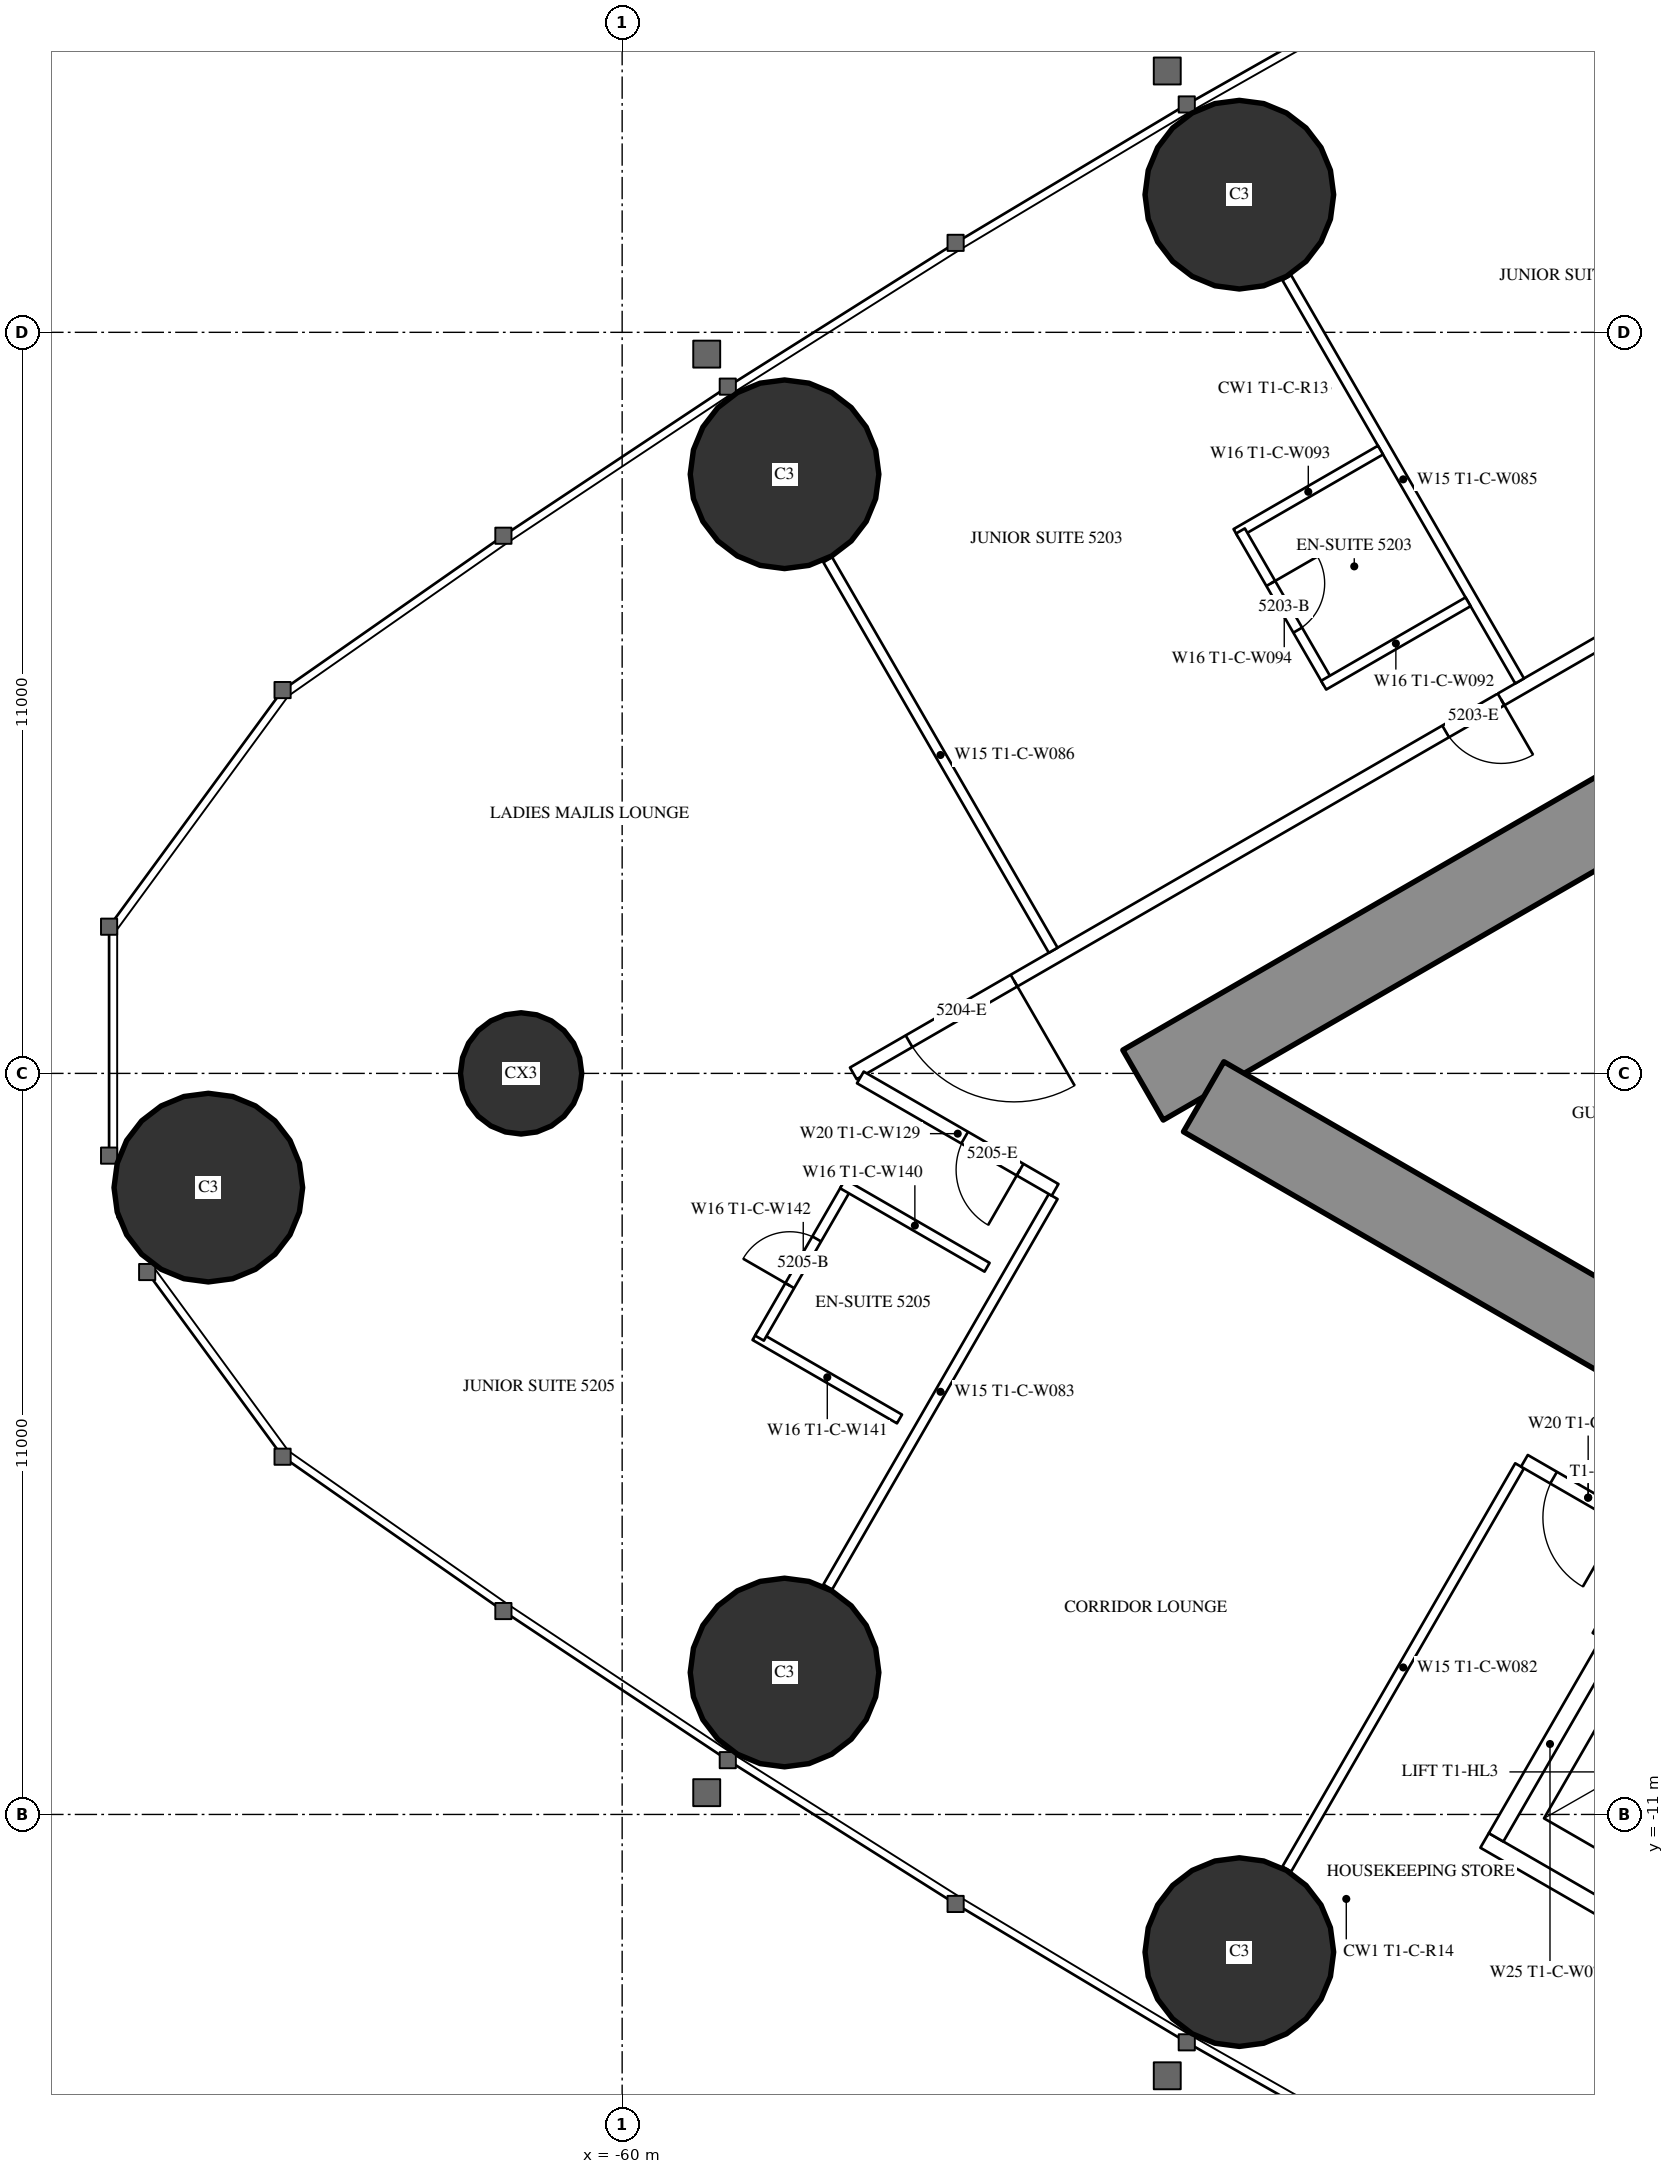
"""IFC4 building model, lengths in metres.
Left out: names, types, materials, properties, quantities, classifications, styles, units other than length and angle.
Written with IfcOpenShell. Run it as: python <this file> out.ifc"""

import sys

from ifc_helpers import new_model, si_unit, direction, frame, frame_2d, origin, origin_2d, place, context, subcontext, project, spatial, rectangle, circle, extrude, element, fill, save


model = new_model("IFC4")
c1 = context("Model", 3, precision=1e-05, world=origin(), true_north=direction((0.0, 1.0)))
c2 = subcontext(c1, "Body", "Model", "MODEL_VIEW")
j1 = project(units=[si_unit("LENGTHUNIT", "METRE"), si_unit("PLANEANGLEUNIT", "RADIAN")], contexts=[c1])
p1 = place(None, origin())
s1 = spatial("IfcSite", under=j1, at=p1, CompositionType="ELEMENT")
p2 = place(p1, origin())
s2 = spatial("IfcBuilding", under=s1, at=p2, CompositionType="ELEMENT")
p3 = place(p2, frame((0.0, 0.0, 194.8)))
s3 = spatial("IfcBuildingStorey", under=s2, at=p3, CompositionType="ELEMENT", Elevation=194.8)
for number, where, z_axis, x_axis in (
    (1, (-66.143, -1.695, 0.0), (0.0, 0.0, 1.0), (1.0, 0.0, 0.0)),
    (2, (-57.59, -8.893, 0.0), (0.0, 0.0, 1.0), (1.0, 0.0, 0.0)),
    (3, (-50.839, -13.043, 0.0), (0.0, 0.0, 1.0), (1.0, 0.0, 0.0)),
    (4, (-50.839, 13.043, 0.0), (0.0, 0.0, 1.0), (1.0, 0.0, 0.0)),
    (5, (-57.59, 8.893, 0.0), (0.0, 0.0, 1.0), (1.0, 0.0, 0.0)),
):
    element("IfcColumn", number, at=place(p3, frame(where, z_axis=z_axis, x_axis=x_axis)), inside=s3, PredefinedType="COLUMN", context=c2, shape_type="SweptSolid", body=[
        extrude(circle(Radius=1.4, at=origin_2d()), origin(), (0.0, 0.0, 1.0), 3.5),
    ])
p4 = place(p3, frame((-61.5, 0.0, 0.0), z_axis=(0.0, 0.0, 1.0), x_axis=(1.0, 0.0, 0.0)))
e6 = element("IfcColumn", 6, at=p4, inside=s3, PredefinedType="COLUMN", context=c2, shape_type="SweptSolid", body=[
    extrude(circle(Radius=0.9, at=origin_2d()), origin(), (0.0, 0.0, 1.0), 3.5),
])
p5 = place(p3, frame((-27.2, 14.3, 0.0), z_axis=(0.0, 0.0, 1.0), x_axis=(-0.866026593062, -0.499997940104, 0.0)))
e7 = element("IfcWall", 7, at=p5, inside=s3, PredefinedType="SHEAR", context=c2, shape_type="SweptSolid", body=[
    extrude(rectangle(XDim=28.946, YDim=1.2, at=frame_2d((14.473, 0.0))), origin(), (0.0, 0.0, 1.0), 3.5),
])
p6 = place(p5, frame((4.6, 0.0, 0.0)))
e8 = element("IfcOpeningElement", 8, at=p6, cuts=e7, PredefinedType="OPENING", context=c2, shape_type="SweptSolid", body=[
    extrude(rectangle(XDim=1.0, YDim=2.2, at=frame_2d((0.5, 1.1))), frame((0.0, 0.61, 0.0), z_axis=(0.0, -1.0, 0.0), x_axis=(1.0, 0.0, 0.0)), (0.0, 0.0, 1.0), 1.22),
])
p7 = place(p5, frame((13.395, 0.0, 0.0)))
e9 = element("IfcOpeningElement", 9, at=p7, cuts=e7, PredefinedType="OPENING", context=c2, shape_type="SweptSolid", body=[
    extrude(rectangle(XDim=1.8, YDim=2.2, at=frame_2d((0.9, 1.1))), frame((0.0, 0.61, 0.0), z_axis=(0.0, -1.0, 0.0), x_axis=(1.0, 0.0, 0.0)), (0.0, 0.0, 1.0), 1.22),
])
p8 = place(p3, frame((-27.2, -14.3, 0.0), z_axis=(0.0, 0.0, 1.0), x_axis=(-0.866024021859, 0.500002393557, 0.0)))
e10 = element("IfcWall", 10, at=p8, inside=s3, PredefinedType="SHEAR", context=c2, shape_type="SweptSolid", body=[
    extrude(rectangle(XDim=27.907, YDim=1.2, at=frame_2d((13.954, 0.0))), origin(), (0.0, 0.0, 1.0), 3.5),
])
p9 = place(p8, frame((4.6, 0.0, 0.0)))
e11 = element("IfcOpeningElement", 11, at=p9, cuts=e10, PredefinedType="OPENING", context=c2, shape_type="SweptSolid", body=[
    extrude(rectangle(XDim=1.0, YDim=2.2, at=frame_2d((0.5, 1.1))), frame((0.0, 0.61, 0.0), z_axis=(0.0, -1.0, 0.0), x_axis=(1.0, 0.0, 0.0)), (0.0, 0.0, 1.0), 1.22),
])
p10 = place(p8, frame((13.395, 0.0, 0.0)))
e12 = element("IfcOpeningElement", 12, at=p10, cuts=e10, PredefinedType="OPENING", context=c2, shape_type="SweptSolid", body=[
    extrude(rectangle(XDim=1.8, YDim=2.2, at=frame_2d((0.9, 1.1))), frame((0.0, 0.61, 0.0), z_axis=(0.0, -1.0, 0.0), x_axis=(1.0, 0.0, 0.0)), (0.0, 0.0, 1.0), 1.22),
])
p11 = place(p3, frame((-27.86, 16.575, 0.0), z_axis=(0.0, 0.0, 1.0), x_axis=(-0.866025533911, -0.499999774615, 0.0)))
e13 = element("IfcWall", 13, at=p11, inside=s3, PredefinedType="PARTITIONING", context=c2, shape_type="SweptSolid", body=[
    extrude(rectangle(XDim=33.149, YDim=0.2, at=frame_2d((16.575, 0.0))), origin(), (0.0, 0.0, 1.0), 3.25),
])
p12 = place(p11, frame((3.75, 0.0, 0.0)))
e14 = element("IfcOpeningElement", 14, at=p12, cuts=e13, PredefinedType="OPENING", context=c2, shape_type="SweptSolid", body=[
    extrude(rectangle(XDim=1.0, YDim=2.2, at=frame_2d((0.5, 1.1))), frame((0.0, 0.11, 0.0), z_axis=(0.0, -1.0, 0.0), x_axis=(1.0, 0.0, 0.0)), (0.0, 0.0, 1.0), 0.22),
])
p13 = place(p11, frame((16.402, 0.0, 0.0)))
e15 = element("IfcOpeningElement", 15, at=p13, cuts=e13, PredefinedType="OPENING", context=c2, shape_type="SweptSolid", body=[
    extrude(rectangle(XDim=0.95, YDim=2.2, at=frame_2d((0.475, 1.1))), frame((0.0, 0.11, 0.0), z_axis=(0.0, -1.0, 0.0), x_axis=(1.0, 0.0, 0.0)), (0.0, 0.0, 1.0), 0.22),
])
p14 = place(p11, frame((22.047, 0.0, 0.0)))
e16 = element("IfcOpeningElement", 16, at=p14, cuts=e13, PredefinedType="OPENING", context=c2, shape_type="SweptSolid", body=[
    extrude(rectangle(XDim=0.95, YDim=2.2, at=frame_2d((0.475, 1.1))), frame((0.0, 0.11, 0.0), z_axis=(0.0, -1.0, 0.0), x_axis=(1.0, 0.0, 0.0)), (0.0, 0.0, 1.0), 0.22),
])
p15 = place(p11, frame((30.396, 0.0, 0.0)))
e17 = element("IfcOpeningElement", 17, at=p15, cuts=e13, PredefinedType="OPENING", context=c2, shape_type="SweptSolid", body=[
    extrude(rectangle(XDim=1.8, YDim=2.2, at=frame_2d((0.9, 1.1))), frame((0.0, 0.11, 0.0), z_axis=(0.0, -1.0, 0.0), x_axis=(1.0, 0.0, 0.0)), (0.0, 0.0, 1.0), 0.22),
])
p16 = place(p3, frame((-46.679, 5.825, 0.0), z_axis=(0.0, 0.0, 1.0), x_axis=(-0.500006839597, 0.866021454905, 0.0)))
e18 = element("IfcWall", 18, at=p16, inside=s3, PredefinedType="PARTITIONING", context=c2, shape_type="SweptSolid", body=[
    extrude(rectangle(XDim=6.911, YDim=0.15, at=frame_2d((3.456, 0.0))), origin(), (0.0, 0.0, 1.0), 2.3),
])
p17 = place(p3, frame((-53.602, 1.828, 0.0), z_axis=(0.0, 0.0, 1.0), x_axis=(-0.49999191814, 0.866030069798, 0.0)))
e19 = element("IfcWall", 19, at=p17, inside=s3, PredefinedType="PARTITIONING", context=c2, shape_type="SweptSolid", body=[
    extrude(rectangle(XDim=6.692, YDim=0.15, at=frame_2d((3.346, 0.0))), origin(), (0.0, 0.0, 1.0), 2.3),
])
p18 = place(p3, frame((-46.679, -5.825, 0.0), z_axis=(0.0, 0.0, 1.0), x_axis=(-0.500006839597, -0.866021454905, 0.0)))
e20 = element("IfcWall", 20, at=p18, inside=s3, PredefinedType="PARTITIONING", context=c2, shape_type="SweptSolid", body=[
    extrude(rectangle(XDim=6.911, YDim=0.15, at=frame_2d((3.456, 0.0))), origin(), (0.0, 0.0, 1.0), 2.3),
])
p19 = place(p3, frame((-53.602, -1.828, 0.0), z_axis=(0.0, 0.0, 1.0), x_axis=(-0.49999191814, -0.866030069798, 0.0)))
e21 = element("IfcWall", 21, at=p19, inside=s3, PredefinedType="PARTITIONING", context=c2, shape_type="SweptSolid", body=[
    extrude(rectangle(XDim=6.692, YDim=0.15, at=frame_2d((3.346, 0.0))), origin(), (0.0, 0.0, 1.0), 2.3),
])
p20 = place(p3, frame((-44.652, -6.764, 0.0), z_axis=(0.0, 0.0, 1.0), x_axis=(-0.485424724123, -0.874278466629, 0.0)))
e22 = element("IfcWall", 22, at=p20, inside=s3, PredefinedType="PARTITIONING", context=c2, shape_type="SweptSolid", body=[
    extrude(rectangle(XDim=1.805, YDim=0.15, at=frame_2d((0.903, 0.0))), origin(), (0.0, 0.0, 1.0), 3.25),
])
p21 = place(p3, frame((-44.715, -6.844, 0.0), z_axis=(0.0, 0.0, 1.0), x_axis=(-0.865999496279, 0.500044870432, 0.0)))
e23 = element("IfcWall", 23, at=p21, inside=s3, PredefinedType="PARTITIONING", context=c2, shape_type="SweptSolid", body=[
    extrude(rectangle(XDim=2.185, YDim=0.2, at=frame_2d((1.092, 0.0))), origin(), (0.0, 0.0, 1.0), 3.25),
])
p22 = place(p21, frame((0.5, 0.0, 0.0)))
e24 = element("IfcOpeningElement", 24, at=p22, cuts=e23, PredefinedType="OPENING", context=c2, shape_type="SweptSolid", body=[
    extrude(rectangle(XDim=1.185, YDim=2.2, at=frame_2d((0.593, 1.1))), frame((0.0, 0.11, 0.0), z_axis=(0.0, -1.0, 0.0), x_axis=(1.0, 0.0, 0.0)), (0.0, 0.0, 1.0), 0.22),
])
p23 = place(p3, frame((-53.574, -1.729, 0.0), z_axis=(0.0, 0.0, 1.0), x_axis=(-0.866019930389, 0.500009480079, 0.0)))
e25 = element("IfcWall", 25, at=p23, inside=s3, PredefinedType="PARTITIONING", context=c2, shape_type="SweptSolid", body=[
    extrude(rectangle(XDim=3.338, YDim=0.2, at=frame_2d((1.669, 0.0))), origin(), (0.0, 0.0, 1.0), 3.25),
])
p24 = place(p23, frame((0.6, 0.0, 0.0)))
e26 = element("IfcOpeningElement", 26, at=p24, cuts=e25, PredefinedType="OPENING", context=c2, shape_type="SweptSolid", body=[
    extrude(rectangle(XDim=0.95, YDim=2.2, at=frame_2d((0.475, 1.1))), frame((0.0, 0.11, 0.0), z_axis=(0.0, -1.0, 0.0), x_axis=(1.0, 0.0, 0.0)), (0.0, 0.0, 1.0), 0.22),
])
p25 = place(p3, frame((-48.744, 9.252, 0.0), z_axis=(0.0, 0.0, 1.0), x_axis=(-0.866006523861, -0.500032699561, 0.0)))
e27 = element("IfcWall", 27, at=p25, inside=s3, PredefinedType="PARTITIONING", context=c2, shape_type="SweptSolid", body=[
    extrude(rectangle(XDim=2.475, YDim=0.15, at=frame_2d((1.237, 0.0))), origin(), (0.0, 0.0, 1.0), 3.25),
])
p26 = place(p3, frame((-49.522, 5.8, 0.0), z_axis=(0.0, 0.0, 1.0), x_axis=(-0.500006934395, 0.866021400173, 0.0)))
e28 = element("IfcWall", 28, at=p26, inside=s3, PredefinedType="PARTITIONING", context=c2, shape_type="SweptSolid", body=[
    extrude(rectangle(XDim=2.6, YDim=0.15, at=frame_2d((1.3, 0.0))), origin(), (0.0, 0.0, 1.0), 3.25),
])
p27 = place(p26, frame((0.9, 0.0, 0.0)))
e29 = element("IfcOpeningElement", 29, at=p27, cuts=e28, PredefinedType="OPENING", context=c2, shape_type="SweptSolid", body=[
    extrude(rectangle(XDim=0.8, YDim=2.2, at=frame_2d((0.4, 1.1))), frame((0.0, 0.085, 0.0), z_axis=(0.0, -1.0, 0.0), x_axis=(1.0, 0.0, 0.0)), (0.0, 0.0, 1.0), 0.17),
])
for number, where, z_axis, x_axis in (
    (30, (-47.444, 7.0, 0.0), (0.0, 0.0, 1.0), (-0.866, -0.5, 0.0)),
    (31, (-55.884, -5.13, 0.0), (0.0, 0.0, 1.0), (-0.866, 0.5, 0.0)),
):
    element("IfcWall", number, at=place(p3, frame(where, z_axis=z_axis, x_axis=x_axis)), inside=s3, PredefinedType="PARTITIONING", context=c2, shape_type="SweptSolid", body=[
        extrude(rectangle(XDim=2.475, YDim=0.15, at=frame_2d((1.237, 0.0))), origin(), (0.0, 0.0, 1.0), 3.25),
    ])
p28 = place(p3, frame((-56.662, -1.678, 0.0), z_axis=(0.0, 0.0, 1.0), x_axis=(-0.500006934395, -0.866021400173, 0.0)))
e32 = element("IfcWall", 32, at=p28, inside=s3, PredefinedType="PARTITIONING", context=c2, shape_type="SweptSolid", body=[
    extrude(rectangle(XDim=2.6, YDim=0.15, at=frame_2d((1.3, 0.0))), origin(), (0.0, 0.0, 1.0), 3.25),
])
p29 = place(p28, frame((0.9, 0.0, 0.0)))
e33 = element("IfcOpeningElement", 33, at=p29, cuts=e32, PredefinedType="OPENING", context=c2, shape_type="SweptSolid", body=[
    extrude(rectangle(XDim=0.8, YDim=2.2, at=frame_2d((0.4, 1.1))), frame((0.0, 0.085, 0.0), z_axis=(0.0, -1.0, 0.0), x_axis=(1.0, 0.0, 0.0)), (0.0, 0.0, 1.0), 0.17),
])
p30 = place(p3, frame((-54.583, -2.878, 0.0), z_axis=(0.0, 0.0, 1.0), x_axis=(-0.866006523861, 0.500032699561, 0.0)))
e34 = element("IfcWall", 34, at=p30, inside=s3, PredefinedType="PARTITIONING", context=c2, shape_type="SweptSolid", body=[
    extrude(rectangle(XDim=2.475, YDim=0.15, at=frame_2d((1.237, 0.0))), origin(), (0.0, 0.0, 1.0), 3.25),
])
p31 = place(p3, frame((-41.482, -14.686, 0.0), z_axis=(0.0, 0.0, 1.0), x_axis=(-0.86603344179, 0.499986077507, 0.0)))
e35 = element("IfcWall", 35, at=p31, inside=s3, PredefinedType="PARTITIONING", context=c2, shape_type="SweptSolid", body=[
    extrude(rectangle(XDim=6.6, YDim=0.25, at=frame_2d((3.3, 0.0))), origin(), (0.0, 0.0, 1.0), 3.25),
])
p32 = place(p3, frame((-45.428, -8.568, 0.0), z_axis=(0.0, 0.0, 1.0), x_axis=(-0.499929347863, -0.866066190972, 0.0)))
e36 = element("IfcWall", 36, at=p32, inside=s3, PredefinedType="PARTITIONING", context=c2, shape_type="SweptSolid", body=[
    extrude(rectangle(XDim=3.201, YDim=0.25, at=frame_2d((1.6, 0.0))), origin(), (0.0, 0.0, 1.0), 3.25),
])
p33 = place(p27, origin())
e37 = element("IfcDoor", 37, at=p33, inside=s3, OperationType="SINGLE_SWING_RIGHT", PredefinedType="DOOR", context=c2, shape_type="SweptSolid", body=[
    extrude(rectangle(XDim=0.8, YDim=2.2, at=frame_2d((0.4, 1.1))), frame((0.0, 0.025, 0.0), z_axis=(0.0, -1.0, 0.0), x_axis=(1.0, 0.0, 0.0)), (0.0, 0.0, 1.0), 0.05),
])
fill(e29, e37)
p34 = place(p14, origin())
e38 = element("IfcDoor", 38, at=p34, inside=s3, OperationType="SINGLE_SWING_LEFT", PredefinedType="DOOR", context=c2, shape_type="SweptSolid", body=[
    extrude(rectangle(XDim=0.95, YDim=2.2, at=frame_2d((0.475, 1.1))), frame((0.0, 0.025, 0.0), z_axis=(0.0, -1.0, 0.0), x_axis=(1.0, 0.0, 0.0)), (0.0, 0.0, 1.0), 0.05),
])
fill(e16, e38)
p35 = place(p15, origin())
e39 = element("IfcDoor", 39, at=p35, inside=s3, OperationType="DOUBLE_DOOR_SINGLE_SWING", PredefinedType="DOOR", context=c2, shape_type="SweptSolid", body=[
    extrude(rectangle(XDim=1.8, YDim=2.2, at=frame_2d((0.9, 1.1))), frame((0.0, 0.025, 0.0), z_axis=(0.0, -1.0, 0.0), x_axis=(1.0, 0.0, 0.0)), (0.0, 0.0, 1.0), 0.05),
])
fill(e17, e39)
p36 = place(p29, origin())
e40 = element("IfcDoor", 40, at=p36, inside=s3, OperationType="SINGLE_SWING_RIGHT", PredefinedType="DOOR", context=c2, shape_type="SweptSolid", body=[
    extrude(rectangle(XDim=0.8, YDim=2.2, at=frame_2d((0.4, 1.1))), frame((0.0, 0.025, 0.0), z_axis=(0.0, -1.0, 0.0), x_axis=(1.0, 0.0, 0.0)), (0.0, 0.0, 1.0), 0.05),
])
fill(e33, e40)
p37 = place(p24, origin())
e41 = element("IfcDoor", 41, at=p37, inside=s3, OperationType="SINGLE_SWING_LEFT", PredefinedType="DOOR", context=c2, shape_type="SweptSolid", body=[
    extrude(rectangle(XDim=0.95, YDim=2.2, at=frame_2d((0.475, 1.1))), frame((0.0, 0.025, 0.0), z_axis=(0.0, -1.0, 0.0), x_axis=(1.0, 0.0, 0.0)), (0.0, 0.0, 1.0), 0.05),
])
fill(e26, e41)
p38 = place(p22, origin())
e42 = element("IfcDoor", 42, at=p38, inside=s3, OperationType="SINGLE_SWING_LEFT", PredefinedType="DOOR", context=c2, shape_type="SweptSolid", body=[
    extrude(rectangle(XDim=1.185, YDim=2.2, at=frame_2d((0.593, 1.1))), frame((0.0, 0.025, 0.0), z_axis=(0.0, -1.0, 0.0), x_axis=(1.0, 0.0, 0.0)), (0.0, 0.0, 1.0), 0.05),
])
fill(e24, e42)
save(model, sys.argv[1])
